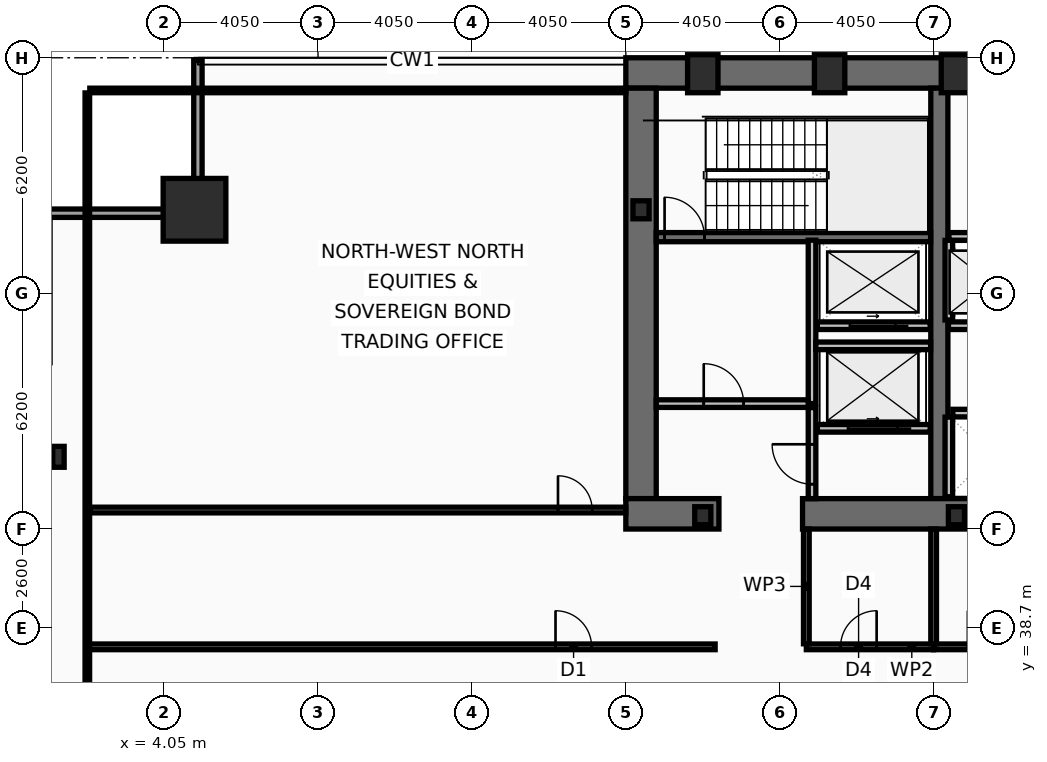
"""IFC4 building model, lengths in metres.
Left out: names, types, materials, properties, quantities, classifications, styles, units other than length and angle.
Written with IfcOpenShell. Run it as: python <this file> out.ifc"""

import sys

from ifc_helpers import new_model, si_unit, direction, frame, frame_2d, origin, origin_2d, place, context, subcontext, project, spatial, rectangle, hollow_rectangle, i_section, extrude, element, fill, save


model = new_model("IFC4")
c1 = context("Model", 3, precision=1e-05, world=origin(), true_north=direction((0.0, 1.0)))
c2 = subcontext(c1, "Body", "Model", "MODEL_VIEW")
j1 = project(units=[si_unit("LENGTHUNIT", "METRE"), si_unit("PLANEANGLEUNIT", "RADIAN")], contexts=[c1])
p1 = place(None, origin())
s1 = spatial("IfcSite", under=j1, at=p1, CompositionType="ELEMENT")
p2 = place(p1, origin())
s2 = spatial("IfcBuilding", under=s1, at=p2, CompositionType="ELEMENT")
p3 = place(p2, frame((0.0, 0.0, 29.8)))
s3 = spatial("IfcBuildingStorey", under=s2, at=p3, CompositionType="ELEMENT", Elevation=29.8)
p4 = place(p3, frame((16.2, 53.3, 0.0), z_axis=(0.0, 0.0, 1.0), x_axis=(1.0, 0.0, 0.0)))
e1 = element("IfcWall", 1, at=p4, inside=s3, PredefinedType="SHEAR", context=c2, shape_type="SweptSolid", body=[
    extrude(rectangle(XDim=40.5, YDim=0.8, at=frame_2d((20.25, 0.0))), origin(), (0.0, 0.0, 1.0), 3.82),
])
p5 = place(p3, frame((16.6, 42.1, 0.0), z_axis=(0.0, 0.0, 1.0), x_axis=(0.0, 1.0, 0.0)))
e2 = element("IfcWall", 2, at=p5, inside=s3, PredefinedType="SHEAR", context=c2, shape_type="SweptSolid", body=[
    extrude(rectangle(XDim=10.8, YDim=0.8, at=frame_2d((5.4, 0.0))), origin(), (0.0, 0.0, 1.0), 3.82),
])
p6 = place(p3, frame((24.45, 42.1, 0.0), z_axis=(0.0, 0.0, 1.0), x_axis=(0.0, 1.0, 0.0)))
e3 = element("IfcWall", 3, at=p6, inside=s3, PredefinedType="SHEAR", context=c2, shape_type="SweptSolid", body=[
    extrude(rectangle(XDim=10.8, YDim=0.45, at=frame_2d((5.4, 0.0))), origin(), (0.0, 0.0, 1.0), 3.82),
])
p7 = place(p3, frame((18.65, 41.7, 0.0), z_axis=(0.0, 0.0, 1.0), x_axis=(-1.0, 0.0, 0.0)))
e4 = element("IfcWall", 4, at=p7, inside=s3, PredefinedType="SHEAR", context=c2, shape_type="SweptSolid", body=[
    extrude(rectangle(XDim=2.45, YDim=0.8, at=frame_2d((1.225, 0.0))), origin(), (0.0, 0.0, 1.0), 3.82),
])
p8 = place(p3, frame((32.3, 41.7, 0.0), z_axis=(0.0, 0.0, 1.0), x_axis=(-1.0, 0.0, 0.0)))
e5 = element("IfcWall", 5, at=p8, inside=s3, PredefinedType="SHEAR", context=c2, shape_type="SweptSolid", body=[
    extrude(rectangle(XDim=11.45, YDim=0.8, at=frame_2d((5.725, 0.0))), origin(), (0.0, 0.0, 1.0), 3.82),
])
p9 = place(p3, frame((17.0, 48.98, 0.0), z_axis=(0.0, 0.0, 1.0), x_axis=(1.0, 0.0, 0.0)))
e6 = element("IfcWall", 6, at=p9, inside=s3, PredefinedType="SHEAR", context=c2, shape_type="SweptSolid", body=[
    extrude(rectangle(XDim=7.22, YDim=0.24, at=frame_2d((3.61, 0.0))), origin(), (0.0, 0.0, 1.0), 3.82),
])
p10 = place(p9, frame((0.22, 0.0, 0.0)))
e7 = element("IfcOpeningElement", 7, at=p10, cuts=e6, PredefinedType="OPENING", context=c2, shape_type="SweptSolid", body=[
    extrude(rectangle(XDim=1.05, YDim=2.15, at=frame_2d((0.525, 1.075))), frame((0.0, 0.13, 0.0), z_axis=(0.0, -1.0, 0.0), x_axis=(1.0, 0.0, 0.0)), (0.0, 0.0, 1.0), 0.26),
])
p11 = place(p3, frame((4.85, 49.7, 0.0), z_axis=(0.0, 0.0, 1.0), x_axis=(1.0, 0.0, 0.0)))
e8 = element("IfcColumn", 8, at=p11, inside=s3, PredefinedType="COLUMN", context=c2, shape_type="SweptSolid", body=[
    extrude(hollow_rectangle(XDim=1.65, YDim=1.65, WallThickness=0.075, at=origin_2d()), origin(), (0.0, 0.0, 1.0), 4.0),
])
for number, where, z_axis, x_axis in (
    (9, (18.225, 53.28, 0.0), (0.0, 0.0, 1.0), (1.0, 0.0, 0.0)),
    (10, (21.562, 53.28, 0.0), (0.0, 0.0, 1.0), (1.0, 0.0, 0.0)),
    (11, (24.9, 53.28, 0.0), (0.0, 0.0, 1.0), (1.0, 0.0, 0.0)),
):
    element("IfcColumn", number, at=place(p3, frame(where, z_axis=z_axis, x_axis=x_axis)), inside=s3, PredefinedType="COLUMN", context=c2, shape_type="SweptSolid", body=[
        extrude(hollow_rectangle(XDim=0.8, YDim=1.0, WallThickness=0.055, at=origin_2d()), origin(), (0.0, 0.0, 1.0), 4.0),
    ])
p12 = place(p3, frame((1.27, 43.2, 0.0), z_axis=(0.0, 0.0, 1.0), x_axis=(1.0, 0.0, 0.0)))
e12 = element("IfcColumn", 12, at=p12, inside=s3, PredefinedType="COLUMN", context=c2, shape_type="SweptSolid", body=[
    extrude(i_section(OverallWidth=0.3, OverallDepth=0.55, WebThickness=0.015, FlangeThickness=0.029, at=origin_2d()), origin(), (0.0, 0.0, 1.0), 4.0),
])
for number, where, z_axis, x_axis in (
    (13, (16.6, 49.7, 0.0), (0.0, 0.0, 1.0), (1.0, 0.0, 0.0)),
    (14, (18.225, 41.65, 0.0), (0.0, 0.0, 1.0), (1.0, 0.0, 0.0)),
    (15, (24.9, 41.65, 0.0), (0.0, 0.0, 1.0), (1.0, 0.0, 0.0)),
):
    element("IfcColumn", number, at=place(p3, frame(where, z_axis=z_axis, x_axis=x_axis)), inside=s3, PredefinedType="COLUMN", context=c2, shape_type="SweptSolid", body=[
        extrude(i_section(OverallWidth=0.424, OverallDepth=0.474, WebThickness=0.048, FlangeThickness=0.077, at=origin_2d()), origin(), (0.0, 0.0, 1.0), 4.0),
    ])
p13 = place(p3, frame((0.83, 49.61, 0.0), z_axis=(0.0, 0.0, 1.0), x_axis=(1.0, 0.0, 0.0)))
e16 = element("IfcWall", 16, at=p13, inside=s3, PredefinedType="SOLIDWALL", context=c2, shape_type="SweptSolid", body=[
    extrude(rectangle(XDim=4.22, YDim=0.22, at=frame_2d((2.11, 0.0))), origin(), (0.0, 0.0, 1.0), 3.16),
])
p14 = place(p3, frame((4.94, 49.72, 0.0), z_axis=(0.0, 0.0, 1.0), x_axis=(0.0, 1.0, 0.0)))
e17 = element("IfcWall", 17, at=p14, inside=s3, PredefinedType="SOLIDWALL", context=c2, shape_type="SweptSolid", body=[
    extrude(rectangle(XDim=3.91, YDim=0.22, at=frame_2d((1.955, 0.0))), origin(), (0.0, 0.0, 1.0), 3.16),
])
p15 = place(p3, frame((24.21, 43.95, 0.0), z_axis=(0.0, 0.0, 1.0), x_axis=(-1.0, 0.0, 0.0)))
e18 = element("IfcWall", 18, at=p15, inside=s3, PredefinedType="PARTITIONING", context=c2, shape_type="SweptSolid", body=[
    extrude(rectangle(XDim=2.97, YDim=0.2, at=frame_2d((1.485, 0.0))), origin(), (0.0, 0.0, 1.0), 3.82),
])
p16 = place(p15, frame((0.86, 0.0, 0.0)))
e19 = element("IfcOpeningElement", 19, at=p16, cuts=e18, PredefinedType="OPENING", context=c2, shape_type="SweptSolid", body=[
    extrude(rectangle(XDim=1.3, YDim=2.18, at=frame_2d((0.65, 1.09))), frame((0.0, 0.11, 0.0), z_axis=(0.0, -1.0, 0.0), x_axis=(1.0, 0.0, 0.0)), (0.0, 0.0, 1.0), 0.22),
])
p17 = place(p3, frame((24.21, 46.65, 0.0), z_axis=(0.0, 0.0, 1.0), x_axis=(-1.0, 0.0, 0.0)))
e20 = element("IfcWall", 20, at=p17, inside=s3, PredefinedType="PARTITIONING", context=c2, shape_type="SweptSolid", body=[
    extrude(rectangle(XDim=2.97, YDim=0.2, at=frame_2d((1.485, 0.0))), origin(), (0.0, 0.0, 1.0), 3.82),
])
p18 = place(p17, frame((0.91, 0.0, 0.0)))
e21 = element("IfcOpeningElement", 21, at=p18, cuts=e20, PredefinedType="OPENING", context=c2, shape_type="SweptSolid", body=[
    extrude(rectangle(XDim=1.2, YDim=2.18, at=frame_2d((0.6, 1.09))), frame((0.0, 0.11, 0.0), z_axis=(0.0, -1.0, 0.0), x_axis=(1.0, 0.0, 0.0)), (0.0, 0.0, 1.0), 0.22),
])
p19 = place(p3, frame((31.22, 46.65, 0.0), z_axis=(0.0, 0.0, 1.0), x_axis=(-1.0, 0.0, 0.0)))
e22 = element("IfcWall", 22, at=p19, inside=s3, PredefinedType="PARTITIONING", context=c2, shape_type="SweptSolid", body=[
    extrude(rectangle(XDim=6.53, YDim=0.2, at=frame_2d((3.265, 0.0))), origin(), (0.0, 0.0, 1.0), 3.82),
])
p20 = place(p19, frame((4.9, 0.0, 0.0)))
e23 = element("IfcOpeningElement", 23, at=p20, cuts=e22, PredefinedType="OPENING", context=c2, shape_type="SweptSolid", body=[
    extrude(rectangle(XDim=1.1, YDim=2.18, at=frame_2d((0.55, 1.09))), frame((0.0, 0.11, 0.0), z_axis=(0.0, -1.0, 0.0), x_axis=(1.0, 0.0, 0.0)), (0.0, 0.0, 1.0), 0.22),
])
p21 = place(p19, frame((2.74, 0.0, 0.0)))
e24 = element("IfcOpeningElement", 24, at=p21, cuts=e22, PredefinedType="OPENING", context=c2, shape_type="SweptSolid", body=[
    extrude(rectangle(XDim=1.1, YDim=2.18, at=frame_2d((0.55, 1.09))), frame((0.0, 0.11, 0.0), z_axis=(0.0, -1.0, 0.0), x_axis=(1.0, 0.0, 0.0)), (0.0, 0.0, 1.0), 0.22),
])
p22 = place(p19, frame((0.58, 0.0, 0.0)))
e25 = element("IfcOpeningElement", 25, at=p22, cuts=e22, PredefinedType="OPENING", context=c2, shape_type="SweptSolid", body=[
    extrude(rectangle(XDim=1.1, YDim=2.18, at=frame_2d((0.55, 1.09))), frame((0.0, 0.11, 0.0), z_axis=(0.0, -1.0, 0.0), x_axis=(1.0, 0.0, 0.0)), (0.0, 0.0, 1.0), 0.22),
])
p23 = place(p3, frame((21.1, 44.6, 0.0), z_axis=(0.0, 0.0, 1.0), x_axis=(0.0, 1.0, 0.0)))
e26 = element("IfcWall", 26, at=p23, inside=s3, PredefinedType="PARTITIONING", context=c2, shape_type="SweptSolid", body=[
    extrude(rectangle(XDim=4.3, YDim=0.2, at=frame_2d((2.15, 0.0))), origin(), (0.0, 0.0, 1.0), 3.82),
])
p24 = place(p3, frame((17.0, 44.6, 0.0), z_axis=(0.0, 0.0, 1.0), x_axis=(1.0, 0.0, 0.0)))
e27 = element("IfcWall", 27, at=p24, inside=s3, PredefinedType="PARTITIONING", context=c2, shape_type="SweptSolid", body=[
    extrude(rectangle(XDim=4.0, YDim=0.2, at=frame_2d((2.0, 0.0))), origin(), (0.0, 0.0, 1.0), 3.82),
])
p25 = place(p24, frame((1.25, 0.0, 0.0)))
e28 = element("IfcOpeningElement", 28, at=p25, cuts=e27, PredefinedType="OPENING", context=c2, shape_type="SweptSolid", body=[
    extrude(rectangle(XDim=1.05, YDim=2.15, at=frame_2d((0.525, 1.075))), frame((0.0, 0.11, 0.0), z_axis=(0.0, -1.0, 0.0), x_axis=(1.0, 0.0, 0.0)), (0.0, 0.0, 1.0), 0.22),
])
p26 = place(p3, frame((21.2, 46.12, 0.0), z_axis=(0.0, 0.0, 1.0), x_axis=(1.0, 0.0, 0.0)))
e29 = element("IfcWall", 29, at=p26, inside=s3, PredefinedType="PARTITIONING", context=c2, shape_type="SweptSolid", body=[
    extrude(rectangle(XDim=3.02, YDim=0.2, at=frame_2d((1.51, 0.0))), origin(), (0.0, 0.0, 1.0), 3.82),
])
p27 = place(p3, frame((21.1, 42.1, 0.0), z_axis=(0.0, 0.0, 1.0), x_axis=(0.0, 1.0, 0.0)))
e30 = element("IfcWall", 30, at=p27, inside=s3, PredefinedType="PARTITIONING", context=c2, shape_type="SweptSolid", body=[
    extrude(rectangle(XDim=2.395, YDim=0.2, at=frame_2d((1.198, 0.0))), origin(), (0.0, 0.0, 1.0), 3.82),
])
p28 = place(p27, frame((0.38, 0.0, 0.0)))
e31 = element("IfcOpeningElement", 31, at=p28, cuts=e30, PredefinedType="OPENING", context=c2, shape_type="SweptSolid", body=[
    extrude(rectangle(XDim=1.05, YDim=2.15, at=frame_2d((0.525, 1.075))), frame((0.0, 0.11, 0.0), z_axis=(0.0, -1.0, 0.0), x_axis=(1.0, 0.0, 0.0)), (0.0, 0.0, 1.0), 0.22),
])
p29 = place(p3, frame((24.7, 46.8, 0.0), z_axis=(0.0, 0.0, 1.0), x_axis=(0.0, 1.0, 0.0)))
e32 = element("IfcWall", 32, at=p29, inside=s3, PredefinedType="PARTITIONING", context=c2, shape_type="SweptSolid", body=[
    extrude(rectangle(XDim=2.095, YDim=0.2, at=frame_2d((1.047, 0.0))), origin(), (0.0, 0.0, 1.0), 3.82),
])
p30 = place(p3, frame((24.805, 44.35, 0.0), z_axis=(0.0, 0.0, 1.0), x_axis=(1.0, 0.0, 0.0)))
e33 = element("IfcWall", 33, at=p30, inside=s3, PredefinedType="PARTITIONING", context=c2, shape_type="SweptSolid", body=[
    extrude(rectangle(XDim=6.27, YDim=0.2, at=frame_2d((3.135, 0.0))), origin(), (0.0, 0.0, 1.0), 3.82),
])
p31 = place(p3, frame((24.7, 42.15, 0.0), z_axis=(0.0, 0.0, 1.0), x_axis=(0.0, 1.0, 0.0)))
e34 = element("IfcWall", 34, at=p31, inside=s3, PredefinedType="PARTITIONING", context=c2, shape_type="SweptSolid", body=[
    extrude(rectangle(XDim=2.095, YDim=0.2, at=frame_2d((1.048, 0.0))), origin(), (0.0, 0.0, 1.0), 3.82),
])
p32 = place(p3, frame((24.7, 52.86, 0.0), z_axis=(0.0, 0.0, 1.0), x_axis=(1.0, 0.0, 0.0)))
e35 = element("IfcWall", 35, at=p32, inside=s3, PredefinedType="PARTITIONING", context=c2, shape_type="SweptSolid", body=[
    extrude(rectangle(XDim=7.72, YDim=0.12, at=frame_2d((3.86, 0.0))), origin(), (0.0, 0.0, 1.0), 3.82),
])
p33 = place(p3, frame((24.7, 49.0, 0.0), z_axis=(0.0, 0.0, 1.0), x_axis=(1.0, 0.0, 0.0)))
e36 = element("IfcWall", 36, at=p33, inside=s3, PredefinedType="PARTITIONING", context=c2, shape_type="SweptSolid", body=[
    extrude(rectangle(XDim=7.72, YDim=0.2, at=frame_2d((3.86, 0.0))), origin(), (0.0, 0.0, 1.0), 3.82),
])
p34 = place(p33, frame((6.56, 0.0, 0.0)))
e37 = element("IfcOpeningElement", 37, at=p34, cuts=e36, PredefinedType="OPENING", context=c2, shape_type="SweptSolid", body=[
    extrude(rectangle(XDim=0.95, YDim=2.1, at=frame_2d((0.475, 1.05))), frame((0.0, 0.11, 0.0), z_axis=(0.0, -1.0, 0.0), x_axis=(1.0, 0.0, 0.0)), (0.0, 0.0, 1.0), 0.22),
])
p35 = place(p3, frame((20.95, 38.2, 0.0), z_axis=(0.0, 0.0, 1.0), x_axis=(1.0, 0.0, 0.0)))
e38 = element("IfcWall", 38, at=p35, inside=s3, PredefinedType="PARTITIONING", context=c2, shape_type="SweptSolid", body=[
    extrude(rectangle(XDim=3.35, YDim=0.15, at=frame_2d((1.675, 0.0))), origin(), (0.0, 0.0, 1.0), 3.82),
])
p36 = place(p35, frame((0.9, 0.0, 0.0)))
e39 = element("IfcOpeningElement", 39, at=p36, cuts=e38, PredefinedType="OPENING", context=c2, shape_type="SweptSolid", body=[
    extrude(rectangle(XDim=0.95, YDim=2.05, at=frame_2d((0.475, 1.025))), frame((0.0, 0.085, 0.0), z_axis=(0.0, -1.0, 0.0), x_axis=(1.0, 0.0, 0.0)), (0.0, 0.0, 1.0), 0.17),
])
p37 = place(p3, frame((24.3, 38.2, 0.0), z_axis=(0.0, 0.0, 1.0), x_axis=(1.0, 0.0, 0.0)))
e40 = element("IfcWall", 40, at=p37, inside=s3, PredefinedType="PARTITIONING", context=c2, shape_type="SweptSolid", body=[
    extrude(rectangle(XDim=4.1, YDim=0.15, at=frame_2d((2.05, 0.0))), origin(), (0.0, 0.0, 1.0), 3.01),
])
p38 = place(p37, frame((0.9, 0.0, 0.0)))
e41 = element("IfcOpeningElement", 41, at=p38, cuts=e40, PredefinedType="OPENING", context=c2, shape_type="SweptSolid", body=[
    extrude(rectangle(XDim=0.95, YDim=2.05, at=frame_2d((0.475, 1.025))), frame((0.0, 0.085, 0.0), z_axis=(0.0, -1.0, 0.0), x_axis=(1.0, 0.0, 0.0)), (0.0, 0.0, 1.0), 0.17),
])
for number, where, z_axis, x_axis in (
    (42, (20.95, 38.28, 0.0), (0.0, 0.0, 1.0), (0.0, 1.0, 0.0)),
    (43, (24.3, 38.28, 0.0), (0.0, 0.0, 1.0), (0.0, 1.0, 0.0)),
):
    element("IfcWall", number, at=place(p3, frame(where, z_axis=z_axis, x_axis=x_axis)), inside=s3, PredefinedType="PARTITIONING", context=c2, shape_type="SweptSolid", body=[
        extrude(rectangle(XDim=3.02, YDim=0.15, at=frame_2d((1.51, 0.0))), origin(), (0.0, 0.0, 1.0), 3.82),
    ])
p39 = place(p3, frame((2.03, 38.2, 0.0), z_axis=(0.0, 0.0, 1.0), x_axis=(1.0, 0.0, 0.0)))
e44 = element("IfcWall", 44, at=p39, inside=s3, PredefinedType="PARTITIONING", context=c2, shape_type="SweptSolid", body=[
    extrude(rectangle(XDim=16.52, YDim=0.15, at=frame_2d((8.26, 0.0))), origin(), (0.0, 0.0, 1.0), 3.01),
])
p40 = place(p39, frame((12.32, 0.0, 0.0)))
e45 = element("IfcOpeningElement", 45, at=p40, cuts=e44, PredefinedType="OPENING", context=c2, shape_type="SweptSolid", body=[
    extrude(rectangle(XDim=0.95, YDim=2.05, at=frame_2d((0.475, 1.025))), frame((0.0, 0.085, 0.0), z_axis=(0.0, -1.0, 0.0), x_axis=(1.0, 0.0, 0.0)), (0.0, 0.0, 1.0), 0.17),
])
p41 = place(p3, frame((2.095, 41.8, 0.0), z_axis=(0.0, 0.0, 1.0), x_axis=(1.0, 0.0, 0.0)))
e46 = element("IfcWall", 46, at=p41, inside=s3, PredefinedType="PARTITIONING", context=c2, shape_type="SweptSolid", body=[
    extrude(rectangle(XDim=14.105, YDim=0.15, at=frame_2d((7.052, 0.0))), origin(), (0.0, 0.0, 1.0), 3.82),
])
p42 = place(p41, frame((12.32, 0.0, 0.0)))
e47 = element("IfcOpeningElement", 47, at=p42, cuts=e46, PredefinedType="OPENING", context=c2, shape_type="SweptSolid", body=[
    extrude(rectangle(XDim=0.9, YDim=2.05, at=frame_2d((0.45, 1.025))), frame((0.0, 0.085, 0.0), z_axis=(0.0, -1.0, 0.0), x_axis=(1.0, 0.0, 0.0)), (0.0, 0.0, 1.0), 0.17),
])
p43 = place(p3, frame((2.03, 10.665, 0.0), z_axis=(0.0, 0.0, 1.0), x_axis=(0.0, 1.0, 0.0)))
e48 = element("IfcWall", 48, at=p43, inside=s3, PredefinedType="PARTITIONING", context=c2, shape_type="SweptSolid", body=[
    extrude(rectangle(XDim=42.11, YDim=0.12, at=frame_2d((21.055, 0.0))), origin(), (0.0, 0.0, 1.0), 3.01),
])
p44 = place(p3, frame((2.095, 52.84, 0.0), z_axis=(0.0, 0.0, 1.0), x_axis=(1.0, 0.0, 0.0)))
e49 = element("IfcWall", 49, at=p44, inside=s3, PredefinedType="PARTITIONING", context=c2, shape_type="SweptSolid", body=[
    extrude(rectangle(XDim=14.105, YDim=0.12, at=frame_2d((7.052, 0.0))), origin(), (0.0, 0.0, 1.0), 3.82),
])
p45 = place(p10, origin())
e50 = element("IfcDoor", 50, at=p45, inside=s3, OperationType="SINGLE_SWING_LEFT", PredefinedType="DOOR", context=c2, shape_type="SweptSolid", body=[
    extrude(rectangle(XDim=1.05, YDim=2.15, at=frame_2d((0.525, 1.075))), frame((0.0, 0.025, 0.0), z_axis=(0.0, -1.0, 0.0), x_axis=(1.0, 0.0, 0.0)), (0.0, 0.0, 1.0), 0.05),
])
fill(e7, e50)
p46 = place(p16, origin())
e51 = element("IfcDoor", 51, at=p46, inside=s3, OperationType="SLIDING_TO_LEFT", PredefinedType="DOOR", context=c2, shape_type="SweptSolid", body=[
    extrude(rectangle(XDim=1.3, YDim=2.18, at=frame_2d((0.65, 1.09))), frame((0.0, 0.025, 0.0), z_axis=(0.0, -1.0, 0.0), x_axis=(1.0, 0.0, 0.0)), (0.0, 0.0, 1.0), 0.05),
])
fill(e19, e51)
p47 = place(p18, origin())
e52 = element("IfcDoor", 52, at=p47, inside=s3, OperationType="SLIDING_TO_LEFT", PredefinedType="DOOR", context=c2, shape_type="SweptSolid", body=[
    extrude(rectangle(XDim=1.2, YDim=2.18, at=frame_2d((0.6, 1.09))), frame((0.0, 0.025, 0.0), z_axis=(0.0, -1.0, 0.0), x_axis=(1.0, 0.0, 0.0)), (0.0, 0.0, 1.0), 0.05),
])
fill(e21, e52)
p48 = place(p25, origin())
e53 = element("IfcDoor", 53, at=p48, inside=s3, OperationType="SINGLE_SWING_LEFT", PredefinedType="DOOR", context=c2, shape_type="SweptSolid", body=[
    extrude(rectangle(XDim=1.05, YDim=2.15, at=frame_2d((0.525, 1.075))), frame((0.0, 0.025, 0.0), z_axis=(0.0, -1.0, 0.0), x_axis=(1.0, 0.0, 0.0)), (0.0, 0.0, 1.0), 0.05),
])
fill(e28, e53)
p49 = place(p28, origin())
e54 = element("IfcDoor", 54, at=p49, inside=s3, OperationType="SINGLE_SWING_RIGHT", PredefinedType="DOOR", context=c2, shape_type="SweptSolid", body=[
    extrude(rectangle(XDim=1.05, YDim=2.15, at=frame_2d((0.525, 1.075))), frame((0.0, 0.025, 0.0), z_axis=(0.0, -1.0, 0.0), x_axis=(1.0, 0.0, 0.0)), (0.0, 0.0, 1.0), 0.05),
])
fill(e31, e54)
p50 = place(p36, origin())
e55 = element("IfcDoor", 55, at=p50, inside=s3, OperationType="SINGLE_SWING_RIGHT", PredefinedType="DOOR", context=c2, shape_type="SweptSolid", body=[
    extrude(rectangle(XDim=0.95, YDim=2.05, at=frame_2d((0.475, 1.025))), frame((0.0, 0.025, 0.0), z_axis=(0.0, -1.0, 0.0), x_axis=(1.0, 0.0, 0.0)), (0.0, 0.0, 1.0), 0.05),
])
fill(e39, e55)
p51 = place(p40, origin())
e56 = element("IfcDoor", 56, at=p51, inside=s3, OperationType="SINGLE_SWING_LEFT", PredefinedType="DOOR", context=c2, shape_type="SweptSolid", body=[
    extrude(rectangle(XDim=0.95, YDim=2.05, at=frame_2d((0.475, 1.025))), frame((0.0, 0.025, 0.0), z_axis=(0.0, -1.0, 0.0), x_axis=(1.0, 0.0, 0.0)), (0.0, 0.0, 1.0), 0.05),
])
fill(e45, e56)
p52 = place(p42, origin())
e57 = element("IfcDoor", 57, at=p52, inside=s3, OperationType="SINGLE_SWING_LEFT", PredefinedType="DOOR", context=c2, shape_type="SweptSolid", body=[
    extrude(rectangle(XDim=0.9, YDim=2.05, at=frame_2d((0.45, 1.025))), frame((0.0, 0.025, 0.0), z_axis=(0.0, -1.0, 0.0), x_axis=(1.0, 0.0, 0.0)), (0.0, 0.0, 1.0), 0.05),
])
fill(e47, e57)
save(model, sys.argv[1])
